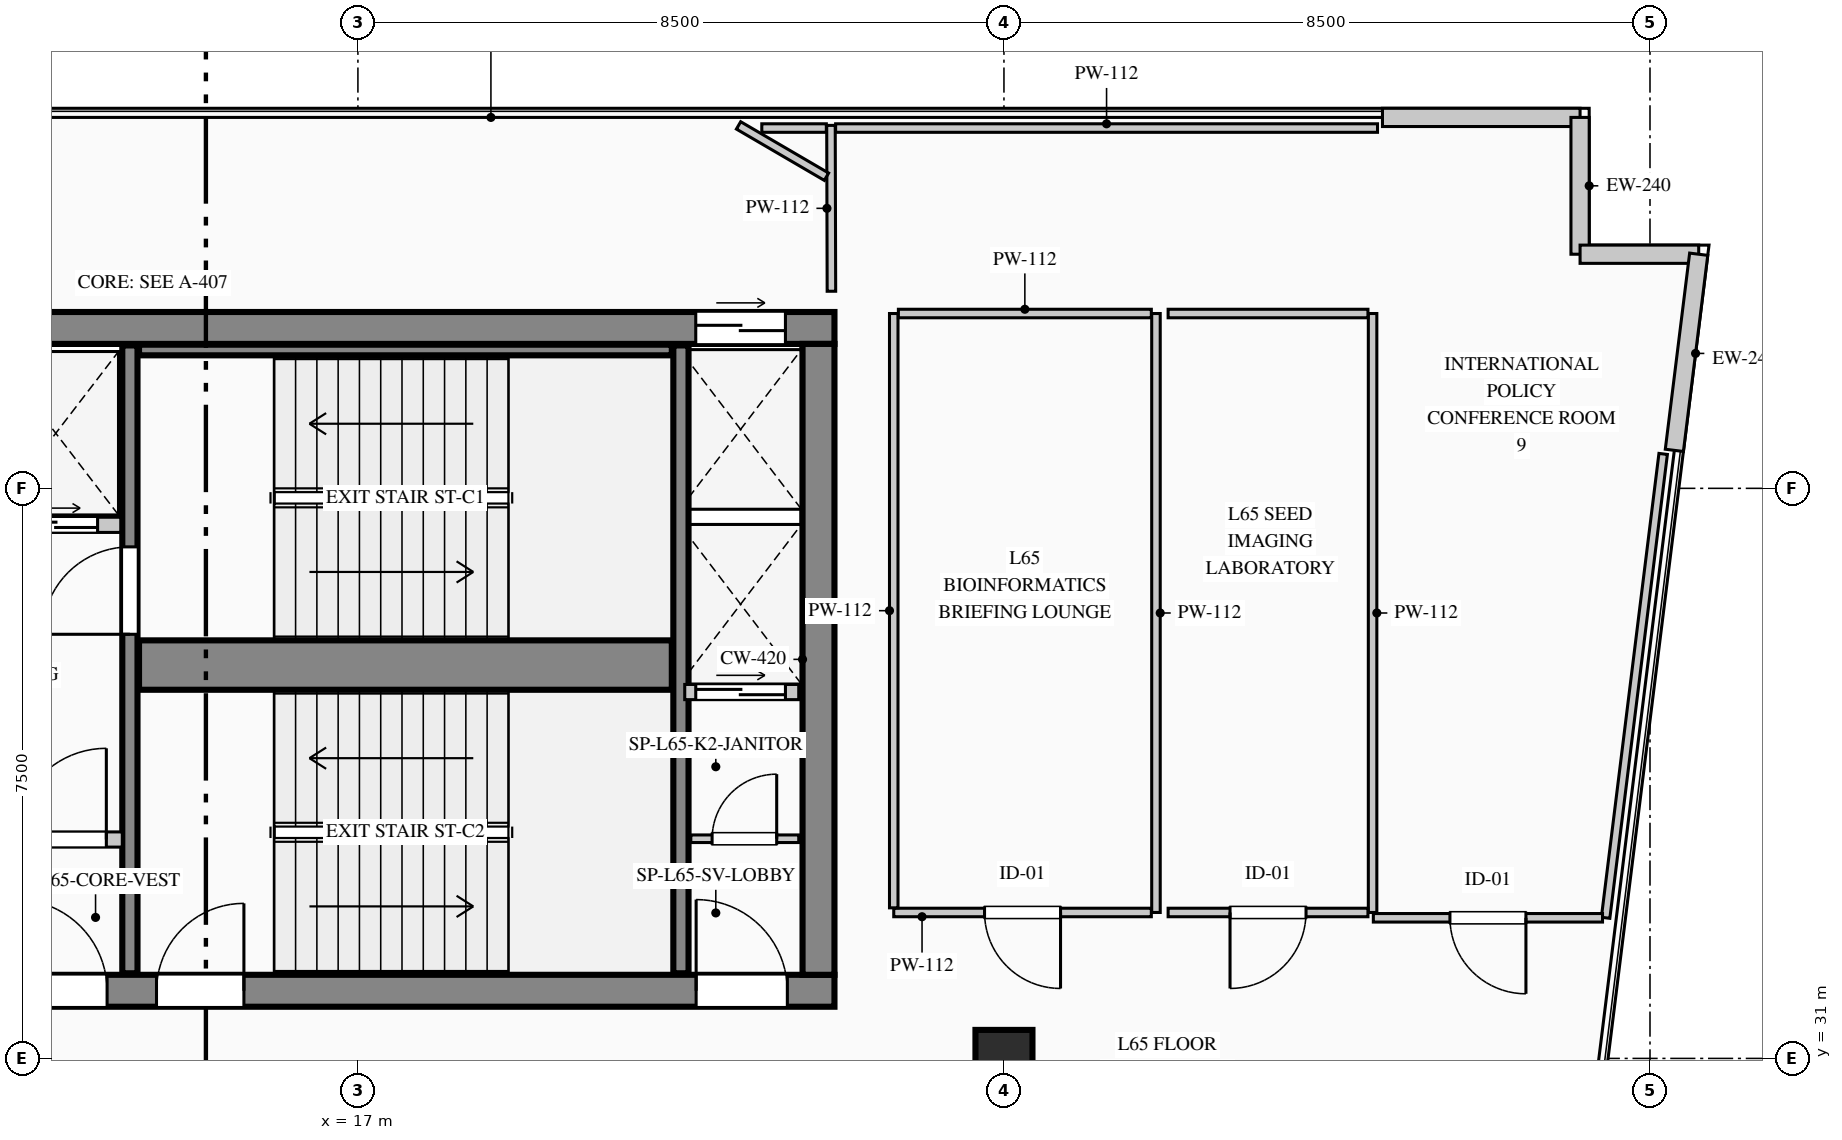
"""IFC4 building model, lengths in metres.
Left out: names, types, materials, properties, quantities, classifications, styles, units other than length and angle.
Written with IfcOpenShell. Run it as: python <this file> out.ifc"""

import sys

from ifc_helpers import new_model, si_unit, direction, frame, frame_2d, origin, origin_2d, place, context, subcontext, project, spatial, rectangle, extrude, element, fill, save


model = new_model("IFC4")
c1 = context("Model", 3, precision=1e-05, world=origin(), true_north=direction((0.0, 1.0)))
c2 = subcontext(c1, "Body", "Model", "MODEL_VIEW")
j1 = project(units=[si_unit("LENGTHUNIT", "METRE"), si_unit("PLANEANGLEUNIT", "RADIAN")], contexts=[c1])
p1 = place(None, origin())
s1 = spatial("IfcSite", under=j1, at=p1, CompositionType="ELEMENT")
p2 = place(p1, origin())
s2 = spatial("IfcBuilding", under=s1, at=p2, CompositionType="ELEMENT")
p3 = place(p2, frame((0.0, 0.0, 272.5)))
s3 = spatial("IfcBuildingStorey", under=s2, at=p3, CompositionType="ELEMENT", Elevation=272.5)
p4 = place(p3, frame((5.58, 40.61, 0.0), z_axis=(0.0, 0.0, 1.0), x_axis=(1.0, 0.0, 0.0)))
e1 = element("IfcWall", 1, at=p4, inside=s3, PredefinedType="SHEAR", context=c2, shape_type="SweptSolid", body=[
    extrude(rectangle(XDim=17.69, YDim=0.42, at=frame_2d((8.845, 0.0))), origin(), (0.0, 0.0, 1.0), 3.95),
])
p5 = place(p4, frame((15.865, 0.0, 0.0)))
e2 = element("IfcOpeningElement", 2, at=p5, cuts=e1, PredefinedType="OPENING", context=c2, shape_type="SweptSolid", body=[
    extrude(rectangle(XDim=1.18, YDim=2.25, at=frame_2d((0.59, 1.125))), frame((0.0, 0.22, 0.0), z_axis=(0.0, -1.0, 0.0), x_axis=(1.0, 0.0, 0.0)), (0.0, 0.0, 1.0), 0.44),
])
p6 = place(p3, frame((5.58, 31.89, 0.0), z_axis=(0.0, 0.0, 1.0), x_axis=(1.0, 0.0, 0.0)))
e3 = element("IfcWall", 3, at=p6, inside=s3, PredefinedType="SHEAR", context=c2, shape_type="SweptSolid", body=[
    extrude(rectangle(XDim=17.69, YDim=0.42, at=frame_2d((8.845, 0.0))), origin(), (0.0, 0.0, 1.0), 3.95),
])
p7 = place(p6, frame((3.07, 0.0, 0.0)))
e4 = element("IfcOpeningElement", 4, at=p7, cuts=e3, PredefinedType="OPENING", context=c2, shape_type="SweptSolid", body=[
    extrude(rectangle(XDim=1.2, YDim=2.2, at=frame_2d((0.6, 1.1))), frame((0.0, 0.22, 0.0), z_axis=(0.0, -1.0, 0.0), x_axis=(1.0, 0.0, 0.0)), (0.0, 0.0, 1.0), 0.44),
])
p8 = place(p6, frame((6.92, 0.0, 0.0)))
e5 = element("IfcOpeningElement", 5, at=p8, cuts=e3, PredefinedType="OPENING", context=c2, shape_type="SweptSolid", body=[
    extrude(rectangle(XDim=1.2, YDim=2.2, at=frame_2d((0.6, 1.1))), frame((0.0, 0.22, 0.0), z_axis=(0.0, -1.0, 0.0), x_axis=(1.0, 0.0, 0.0)), (0.0, 0.0, 1.0), 0.44),
])
p9 = place(p6, frame((8.77, 0.0, 0.0)))
e6 = element("IfcOpeningElement", 6, at=p9, cuts=e3, PredefinedType="OPENING", context=c2, shape_type="SweptSolid", body=[
    extrude(rectangle(XDim=1.15, YDim=2.2, at=frame_2d((0.575, 1.1))), frame((0.0, 0.22, 0.0), z_axis=(0.0, -1.0, 0.0), x_axis=(1.0, 0.0, 0.0)), (0.0, 0.0, 1.0), 0.44),
])
p10 = place(p6, frame((15.87, 0.0, 0.0)))
e7 = element("IfcOpeningElement", 7, at=p10, cuts=e3, PredefinedType="OPENING", context=c2, shape_type="SweptSolid", body=[
    extrude(rectangle(XDim=1.2, YDim=2.2, at=frame_2d((0.6, 1.1))), frame((0.0, 0.22, 0.0), z_axis=(0.0, -1.0, 0.0), x_axis=(1.0, 0.0, 0.0)), (0.0, 0.0, 1.0), 0.44),
])
p11 = place(p3, frame((23.06, 32.1, 0.0), z_axis=(0.0, 0.0, 1.0), x_axis=(0.0, 1.0, 0.0)))
e8 = element("IfcWall", 8, at=p11, inside=s3, PredefinedType="SHEAR", context=c2, shape_type="SweptSolid", body=[
    extrude(rectangle(XDim=8.3, YDim=0.42, at=frame_2d((4.15, 0.0))), origin(), (0.0, 0.0, 1.0), 3.95),
])
p12 = place(p3, frame((14.0, 32.12, 0.0), z_axis=(0.0, 0.0, 1.0), x_axis=(0.0, 1.0, 0.0)))
e9 = element("IfcWall", 9, at=p12, inside=s3, PredefinedType="SHEAR", context=c2, shape_type="SweptSolid", body=[
    extrude(rectangle(XDim=8.26, YDim=0.2, at=frame_2d((4.13, 0.0))), origin(), (0.0, 0.0, 1.0), 3.95),
])
p13 = place(p12, frame((4.46, 0.0, 0.0)))
e10 = element("IfcOpeningElement", 10, at=p13, cuts=e9, PredefinedType="OPENING", context=c2, shape_type="SweptSolid", body=[
    extrude(rectangle(XDim=1.15, YDim=2.2, at=frame_2d((0.575, 1.1))), frame((0.0, 0.11, 0.0), z_axis=(0.0, -1.0, 0.0), x_axis=(1.0, 0.0, 0.0)), (0.0, 0.0, 1.0), 0.22),
])
p14 = place(p3, frame((14.12, 36.175, 0.0), z_axis=(0.0, 0.0, 1.0), x_axis=(1.0, 0.0, 0.0)))
e11 = element("IfcWall", 11, at=p14, inside=s3, PredefinedType="SHEAR", context=c2, shape_type="SweptSolid", body=[
    extrude(rectangle(XDim=7.01, YDim=0.65, at=frame_2d((3.505, 0.0))), origin(), (0.0, 0.0, 1.0), 3.95),
])
p15 = place(p3, frame((21.25, 32.12, 0.0), z_axis=(0.0, 0.0, 1.0), x_axis=(0.0, 1.0, 0.0)))
e12 = element("IfcWall", 12, at=p15, inside=s3, PredefinedType="SHEAR", context=c2, shape_type="SweptSolid", body=[
    extrude(rectangle(XDim=8.26, YDim=0.2, at=frame_2d((4.13, 0.0))), origin(), (0.0, 0.0, 1.0), 3.95),
])
p16 = place(p3, frame((14.12, 40.32, 0.0), z_axis=(0.0, 0.0, 1.0), x_axis=(1.0, 0.0, 0.0)))
e13 = element("IfcWall", 13, at=p16, inside=s3, PredefinedType="SHEAR", context=c2, shape_type="SweptSolid", body=[
    extrude(rectangle(XDim=7.01, YDim=0.14, at=frame_2d((3.505, 0.0))), origin(), (0.0, 0.0, 1.0), 3.95),
])
p17 = place(p3, frame((25.5, 31.0, 0.0), z_axis=(0.0, 0.0, 1.0), x_axis=(1.0, 0.0, 0.0)))
e14 = element("IfcColumn", 14, at=p17, inside=s3, PredefinedType="COLUMN", context=c2, shape_type="SweptSolid", body=[
    extrude(rectangle(XDim=0.75, YDim=0.75, at=origin_2d()), origin(), (0.0, 0.0, 1.0), 3.95),
])
p18 = place(p3, frame((30.48, 43.38, 0.0), z_axis=(0.0, 0.0, 1.0), x_axis=(1.0, 0.0, 0.0)))
e15 = element("IfcWall", 15, at=p18, inside=s3, PredefinedType="STANDARD", context=c2, shape_type="SweptSolid", body=[
    extrude(rectangle(XDim=2.6, YDim=0.24, at=frame_2d((1.3, 0.0))), origin(), (0.0, 0.0, 1.0), 3.7),
])
p19 = place(p3, frame((33.08, 43.38, 0.0), z_axis=(0.0, 0.0, 1.0), x_axis=(0.0, -1.0, 0.0)))
e16 = element("IfcWall", 16, at=p19, inside=s3, PredefinedType="STANDARD", context=c2, shape_type="SweptSolid", body=[
    extrude(rectangle(XDim=1.8, YDim=0.24, at=frame_2d((0.9, 0.0))), origin(), (0.0, 0.0, 1.0), 3.7),
])
p20 = place(p3, frame((33.08, 41.58, 0.0), z_axis=(0.0, 0.0, 1.0), x_axis=(1.0, 0.0, 0.0)))
e17 = element("IfcWall", 17, at=p20, inside=s3, PredefinedType="STANDARD", context=c2, shape_type="SweptSolid", body=[
    extrude(rectangle(XDim=1.561, YDim=0.24, at=frame_2d((0.78, 0.0))), origin(), (0.0, 0.0, 1.0), 3.7),
])
p21 = place(p3, frame((34.641, 41.58, 0.0), z_axis=(0.0, 0.0, 1.0), x_axis=(-0.123191073593, -0.992382970121, 0.0)))
e18 = element("IfcWall", 18, at=p21, inside=s3, PredefinedType="STANDARD", context=c2, shape_type="SweptSolid", body=[
    extrude(rectangle(XDim=2.6, YDim=0.24, at=frame_2d((1.3, 0.0))), origin(), (0.0, 0.0, 1.0), 3.7),
])
p22 = place(p3, frame((10.34, 38.02, 0.0), z_axis=(0.0, 0.0, 1.0), x_axis=(1.0, 0.0, 0.0)))
e19 = element("IfcWall", 19, at=p22, inside=s3, PredefinedType="PARTITIONING", context=c2, shape_type="SweptSolid", body=[
    extrude(rectangle(XDim=3.54, YDim=0.2, at=frame_2d((1.77, 0.0))), origin(), (0.0, 0.0, 1.0), 3.7),
])
p23 = place(p22, frame((0.285, 0.0, 0.0)))
e20 = element("IfcOpeningElement", 20, at=p23, cuts=e19, PredefinedType="OPENING", context=c2, shape_type="SweptSolid", body=[
    extrude(rectangle(XDim=1.1, YDim=2.2, at=frame_2d((0.55, 1.1))), frame((0.0, 0.11, 0.0), z_axis=(0.0, -1.0, 0.0), x_axis=(1.0, 0.0, 0.0)), (0.0, 0.0, 1.0), 0.22),
])
p24 = place(p22, frame((2.135, 0.0, 0.0)))
e21 = element("IfcOpeningElement", 21, at=p24, cuts=e19, PredefinedType="OPENING", context=c2, shape_type="SweptSolid", body=[
    extrude(rectangle(XDim=1.1, YDim=2.2, at=frame_2d((0.55, 1.1))), frame((0.0, 0.11, 0.0), z_axis=(0.0, -1.0, 0.0), x_axis=(1.0, 0.0, 0.0)), (0.0, 0.0, 1.0), 0.22),
])
p25 = place(p3, frame((10.34, 33.88, 0.0), z_axis=(0.0, 0.0, 1.0), x_axis=(1.0, 0.0, 0.0)))
e22 = element("IfcWall", 22, at=p25, inside=s3, PredefinedType="PARTITIONING", context=c2, shape_type="SweptSolid", body=[
    extrude(rectangle(XDim=3.56, YDim=0.2, at=frame_2d((1.78, 0.0))), origin(), (0.0, 0.0, 1.0), 3.7),
])
p26 = place(p25, frame((2.15, 0.0, 0.0)))
e23 = element("IfcOpeningElement", 23, at=p26, cuts=e22, PredefinedType="OPENING", context=c2, shape_type="SweptSolid", body=[
    extrude(rectangle(XDim=1.2, YDim=2.2, at=frame_2d((0.6, 1.1))), frame((0.0, 0.11, 0.0), z_axis=(0.0, -1.0, 0.0), x_axis=(1.0, 0.0, 0.0)), (0.0, 0.0, 1.0), 0.22),
])
p27 = place(p3, frame((21.38, 33.89, 0.0), z_axis=(0.0, 0.0, 1.0), x_axis=(1.0, 0.0, 0.0)))
e24 = element("IfcWall", 24, at=p27, inside=s3, PredefinedType="PARTITIONING", context=c2, shape_type="SweptSolid", body=[
    extrude(rectangle(XDim=1.42, YDim=0.1, at=frame_2d((0.71, 0.0))), origin(), (0.0, 0.0, 1.0), 3.7),
])
p28 = place(p27, frame((0.28, 0.0, 0.0)))
e25 = element("IfcOpeningElement", 25, at=p28, cuts=e24, PredefinedType="OPENING", context=c2, shape_type="SweptSolid", body=[
    extrude(rectangle(XDim=0.85, YDim=2.1, at=frame_2d((0.425, 1.05))), frame((0.0, 0.06, 0.0), z_axis=(0.0, -1.0, 0.0), x_axis=(1.0, 0.0, 0.0)), (0.0, 0.0, 1.0), 0.12),
])
p29 = place(p3, frame((21.3, 35.82, 0.0), z_axis=(0.0, 0.0, 1.0), x_axis=(1.0, 0.0, 0.0)))
e26 = element("IfcWall", 26, at=p29, inside=s3, PredefinedType="PARTITIONING", context=c2, shape_type="SweptSolid", body=[
    extrude(rectangle(XDim=1.5, YDim=0.2, at=frame_2d((0.75, 0.0))), origin(), (0.0, 0.0, 1.0), 3.7),
])
p30 = place(p29, frame((0.145, 0.0, 0.0)))
e27 = element("IfcOpeningElement", 27, at=p30, cuts=e26, PredefinedType="OPENING", context=c2, shape_type="SweptSolid", body=[
    extrude(rectangle(XDim=1.18, YDim=2.25, at=frame_2d((0.59, 1.125))), frame((0.0, 0.11, 0.0), z_axis=(0.0, -1.0, 0.0), x_axis=(1.0, 0.0, 0.0)), (0.0, 0.0, 1.0), 0.22),
])
p31 = place(p3, frame((27.5, 40.8, 0.0), z_axis=(0.0, 0.0, 1.0), x_axis=(0.0, -1.0, 0.0)))
e28 = element("IfcWall", 28, at=p31, inside=s3, PredefinedType="PARTITIONING", context=c2, shape_type="SweptSolid", body=[
    extrude(rectangle(XDim=7.88, YDim=0.112, at=frame_2d((3.94, 0.0))), origin(), (0.0, 0.0, 1.0), 3.7),
])
p32 = place(p3, frame((27.439, 32.92, 0.0), z_axis=(0.0, 0.0, 1.0), x_axis=(-1.0, 0.0, 0.0)))
e29 = element("IfcWall", 29, at=p32, inside=s3, PredefinedType="PARTITIONING", context=c2, shape_type="SweptSolid", body=[
    extrude(rectangle(XDim=3.389, YDim=0.112, at=frame_2d((1.694, 0.0))), origin(), (0.0, 0.0, 1.0), 3.7),
])
p33 = place(p32, frame((1.195, 0.0, 0.0)))
e30 = element("IfcOpeningElement", 30, at=p33, cuts=e29, PredefinedType="OPENING", context=c2, shape_type="SweptSolid", body=[
    extrude(rectangle(XDim=1.0, YDim=2.15, at=frame_2d((0.5, 1.075))), frame((0.0, 0.066, 0.0), z_axis=(0.0, -1.0, 0.0), x_axis=(1.0, 0.0, 0.0)), (0.0, 0.0, 1.0), 0.132),
])
p34 = place(p3, frame((24.05, 32.981, 0.0), z_axis=(0.0, 0.0, 1.0), x_axis=(0.0, 1.0, 0.0)))
e31 = element("IfcWall", 31, at=p34, inside=s3, PredefinedType="PARTITIONING", context=c2, shape_type="SweptSolid", body=[
    extrude(rectangle(XDim=7.819, YDim=0.112, at=frame_2d((3.91, 0.0))), origin(), (0.0, 0.0, 1.0), 3.7),
])
p35 = place(p3, frame((24.111, 40.8, 0.0), z_axis=(0.0, 0.0, 1.0), x_axis=(1.0, 0.0, 0.0)))
e32 = element("IfcWall", 32, at=p35, inside=s3, PredefinedType="PARTITIONING", context=c2, shape_type="SweptSolid", body=[
    extrude(rectangle(XDim=3.328, YDim=0.112, at=frame_2d((1.664, 0.0))), origin(), (0.0, 0.0, 1.0), 3.7),
])
p36 = place(p3, frame((30.35, 40.8, 0.0), z_axis=(0.0, 0.0, 1.0), x_axis=(0.0, -1.0, 0.0)))
e33 = element("IfcWall", 33, at=p36, inside=s3, PredefinedType="PARTITIONING", context=c2, shape_type="SweptSolid", body=[
    extrude(rectangle(XDim=7.88, YDim=0.112, at=frame_2d((3.94, 0.0))), origin(), (0.0, 0.0, 1.0), 3.7),
])
p37 = place(p3, frame((30.289, 32.92, 0.0), z_axis=(0.0, 0.0, 1.0), x_axis=(-1.0, 0.0, 0.0)))
e34 = element("IfcWall", 34, at=p37, inside=s3, PredefinedType="PARTITIONING", context=c2, shape_type="SweptSolid", body=[
    extrude(rectangle(XDim=2.629, YDim=0.112, at=frame_2d((1.314, 0.0))), origin(), (0.0, 0.0, 1.0), 3.7),
])
p38 = place(p37, frame((0.814, 0.0, 0.0)))
e35 = element("IfcOpeningElement", 35, at=p38, cuts=e34, PredefinedType="OPENING", context=c2, shape_type="SweptSolid", body=[
    extrude(rectangle(XDim=1.0, YDim=2.15, at=frame_2d((0.5, 1.075))), frame((0.0, 0.066, 0.0), z_axis=(0.0, -1.0, 0.0), x_axis=(1.0, 0.0, 0.0)), (0.0, 0.0, 1.0), 0.132),
])
p39 = place(p3, frame((27.66, 40.8, 0.0), z_axis=(0.0, 0.0, 1.0), x_axis=(1.0, 0.0, 0.0)))
e36 = element("IfcWall", 36, at=p39, inside=s3, PredefinedType="PARTITIONING", context=c2, shape_type="SweptSolid", body=[
    extrude(rectangle(XDim=2.629, YDim=0.112, at=frame_2d((1.314, 0.0))), origin(), (0.0, 0.0, 1.0), 3.7),
])
p40 = place(p3, frame((23.23, 41.093, 0.0), z_axis=(0.0, 0.0, 1.0), x_axis=(-0.002685455238, 0.999996394159, 0.0)))
e37 = element("IfcWall", 37, at=p40, inside=s3, PredefinedType="PARTITIONING", context=c2, shape_type="SweptSolid", body=[
    extrude(rectangle(XDim=2.182, YDim=0.112, at=frame_2d((1.091, 0.0))), origin(), (0.0, 0.0, 1.0), 3.7),
])
p41 = place(p3, frame((23.165, 42.6, 0.0), z_axis=(0.0, 0.0, 1.0), x_axis=(-0.863606966756, 0.504165654295, 0.0)))
e38 = element("IfcWall", 38, at=p41, inside=s3, PredefinedType="PARTITIONING", context=c2, shape_type="SweptSolid", body=[
    extrude(rectangle(XDim=1.339, YDim=0.112, at=frame_2d((0.67, 0.0))), origin(), (0.0, 0.0, 1.0), 3.7),
])
p42 = place(p3, frame((22.314, 43.24, 0.0), z_axis=(0.0, 0.0, 1.0), x_axis=(1.0, 0.0, 0.0)))
e39 = element("IfcWall", 39, at=p42, inside=s3, PredefinedType="PARTITIONING", context=c2, shape_type="SweptSolid", body=[
    extrude(rectangle(XDim=0.849, YDim=0.112, at=frame_2d((0.425, 0.0))), origin(), (0.0, 0.0, 1.0), 3.7),
])
p43 = place(p3, frame((23.285, 43.24, 0.0), z_axis=(0.0, 0.0, 1.0), x_axis=(1.0, 0.0, 0.0)))
e40 = element("IfcWall", 40, at=p43, inside=s3, PredefinedType="PARTITIONING", context=c2, shape_type="SweptSolid", body=[
    extrude(rectangle(XDim=7.13, YDim=0.112, at=frame_2d((3.565, 0.0))), origin(), (0.0, 0.0, 1.0), 3.7),
])
p44 = place(p3, frame((34.173, 38.953, 0.0), z_axis=(0.0, 0.0, 1.0), x_axis=(-0.123155137196, -0.992387430484, 0.0)))
e41 = element("IfcWall", 41, at=p44, inside=s3, PredefinedType="PARTITIONING", context=c2, shape_type="SweptSolid", body=[
    extrude(rectangle(XDim=6.149, YDim=0.112, at=frame_2d((3.075, 0.0))), origin(), (0.0, 0.0, 1.0), 3.7),
])
p45 = place(p3, frame((33.375, 32.85, 0.0), z_axis=(0.0, 0.0, 1.0), x_axis=(-1.0, 0.0, 0.0)))
e42 = element("IfcWall", 42, at=p45, inside=s3, PredefinedType="PARTITIONING", context=c2, shape_type="SweptSolid", body=[
    extrude(rectangle(XDim=3.015, YDim=0.112, at=frame_2d((1.508, 0.0))), origin(), (0.0, 0.0, 1.0), 3.7),
])
p46 = place(p45, frame((1.008, 0.0, 0.0)))
e43 = element("IfcOpeningElement", 43, at=p46, cuts=e42, PredefinedType="OPENING", context=c2, shape_type="SweptSolid", body=[
    extrude(rectangle(XDim=1.0, YDim=2.15, at=frame_2d((0.5, 1.075))), frame((0.0, 0.066, 0.0), z_axis=(0.0, -1.0, 0.0), x_axis=(1.0, 0.0, 0.0)), (0.0, 0.0, 1.0), 0.132),
])
p47 = place(p8, origin())
e44 = element("IfcDoor", 44, at=p47, inside=s3, OperationType="SINGLE_SWING_LEFT", PredefinedType="DOOR", context=c2, shape_type="SweptSolid", body=[
    extrude(rectangle(XDim=1.2, YDim=2.2, at=frame_2d((0.6, 1.1))), frame((0.0, 0.025, 0.0), z_axis=(0.0, -1.0, 0.0), x_axis=(1.0, 0.0, 0.0)), (0.0, 0.0, 1.0), 0.05),
])
fill(e5, e44)
p48 = place(p9, origin())
e45 = element("IfcDoor", 45, at=p48, inside=s3, OperationType="SINGLE_SWING_RIGHT", PredefinedType="DOOR", context=c2, shape_type="SweptSolid", body=[
    extrude(rectangle(XDim=1.15, YDim=2.2, at=frame_2d((0.575, 1.1))), frame((0.0, 0.025, 0.0), z_axis=(0.0, -1.0, 0.0), x_axis=(1.0, 0.0, 0.0)), (0.0, 0.0, 1.0), 0.05),
])
fill(e6, e45)
p49 = place(p10, origin())
e46 = element("IfcDoor", 46, at=p49, inside=s3, OperationType="SINGLE_SWING_LEFT", PredefinedType="DOOR", context=c2, shape_type="SweptSolid", body=[
    extrude(rectangle(XDim=1.2, YDim=2.2, at=frame_2d((0.6, 1.1))), frame((0.0, 0.025, 0.0), z_axis=(0.0, -1.0, 0.0), x_axis=(1.0, 0.0, 0.0)), (0.0, 0.0, 1.0), 0.05),
])
fill(e7, e46)
p50 = place(p26, origin())
e47 = element("IfcDoor", 47, at=p50, inside=s3, OperationType="SINGLE_SWING_RIGHT", PredefinedType="DOOR", context=c2, shape_type="SweptSolid", body=[
    extrude(rectangle(XDim=1.2, YDim=2.2, at=frame_2d((0.6, 1.1))), frame((0.0, 0.025, 0.0), z_axis=(0.0, -1.0, 0.0), x_axis=(1.0, 0.0, 0.0)), (0.0, 0.0, 1.0), 0.05),
])
fill(e23, e47)
p51 = place(p28, origin())
e48 = element("IfcDoor", 48, at=p51, inside=s3, OperationType="SINGLE_SWING_RIGHT", PredefinedType="DOOR", context=c2, shape_type="SweptSolid", body=[
    extrude(rectangle(XDim=0.85, YDim=2.1, at=frame_2d((0.425, 1.05))), frame((0.0, 0.025, 0.0), z_axis=(0.0, -1.0, 0.0), x_axis=(1.0, 0.0, 0.0)), (0.0, 0.0, 1.0), 0.05),
])
fill(e25, e48)
p52 = place(p13, origin())
e49 = element("IfcDoor", 49, at=p52, inside=s3, OperationType="SINGLE_SWING_LEFT", PredefinedType="DOOR", context=c2, shape_type="SweptSolid", body=[
    extrude(rectangle(XDim=1.15, YDim=2.2, at=frame_2d((0.575, 1.1))), frame((0.0, 0.025, 0.0), z_axis=(0.0, -1.0, 0.0), x_axis=(1.0, 0.0, 0.0)), (0.0, 0.0, 1.0), 0.05),
])
fill(e10, e49)
p53 = place(p24, origin())
e50 = element("IfcDoor", 50, at=p53, inside=s3, OperationType="DOUBLE_DOOR_SLIDING", PredefinedType="DOOR", context=c2, shape_type="SweptSolid", body=[
    extrude(rectangle(XDim=1.1, YDim=2.2, at=frame_2d((0.55, 1.1))), frame((0.0, 0.025, 0.0), z_axis=(0.0, -1.0, 0.0), x_axis=(1.0, 0.0, 0.0)), (0.0, 0.0, 1.0), 0.05),
])
fill(e21, e50)
p54 = place(p5, origin())
e51 = element("IfcDoor", 51, at=p54, inside=s3, OperationType="DOUBLE_DOOR_SLIDING", PredefinedType="DOOR", context=c2, shape_type="SweptSolid", body=[
    extrude(rectangle(XDim=1.18, YDim=2.25, at=frame_2d((0.59, 1.125))), frame((0.0, 0.025, 0.0), z_axis=(0.0, -1.0, 0.0), x_axis=(1.0, 0.0, 0.0)), (0.0, 0.0, 1.0), 0.05),
])
fill(e2, e51)
p55 = place(p30, origin())
e52 = element("IfcDoor", 52, at=p55, inside=s3, OperationType="DOUBLE_DOOR_SLIDING", PredefinedType="DOOR", context=c2, shape_type="SweptSolid", body=[
    extrude(rectangle(XDim=1.18, YDim=2.25, at=frame_2d((0.59, 1.125))), frame((0.0, 0.025, 0.0), z_axis=(0.0, -1.0, 0.0), x_axis=(1.0, 0.0, 0.0)), (0.0, 0.0, 1.0), 0.05),
])
fill(e27, e52)
p56 = place(p33, origin())
e53 = element("IfcDoor", 53, at=p56, inside=s3, OperationType="SINGLE_SWING_LEFT", PredefinedType="DOOR", context=c2, shape_type="SweptSolid", body=[
    extrude(rectangle(XDim=1.0, YDim=2.15, at=frame_2d((0.5, 1.075))), frame((0.0, 0.025, 0.0), z_axis=(0.0, -1.0, 0.0), x_axis=(1.0, 0.0, 0.0)), (0.0, 0.0, 1.0), 0.05),
])
fill(e30, e53)
p57 = place(p38, origin())
e54 = element("IfcDoor", 54, at=p57, inside=s3, OperationType="SINGLE_SWING_RIGHT", PredefinedType="DOOR", context=c2, shape_type="SweptSolid", body=[
    extrude(rectangle(XDim=1.0, YDim=2.15, at=frame_2d((0.5, 1.075))), frame((0.0, 0.025, 0.0), z_axis=(0.0, -1.0, 0.0), x_axis=(1.0, 0.0, 0.0)), (0.0, 0.0, 1.0), 0.05),
])
fill(e35, e54)
p58 = place(p46, origin())
e55 = element("IfcDoor", 55, at=p58, inside=s3, OperationType="SINGLE_SWING_LEFT", PredefinedType="DOOR", context=c2, shape_type="SweptSolid", body=[
    extrude(rectangle(XDim=1.0, YDim=2.15, at=frame_2d((0.5, 1.075))), frame((0.0, 0.025, 0.0), z_axis=(0.0, -1.0, 0.0), x_axis=(1.0, 0.0, 0.0)), (0.0, 0.0, 1.0), 0.05),
])
fill(e43, e55)
save(model, sys.argv[1])
